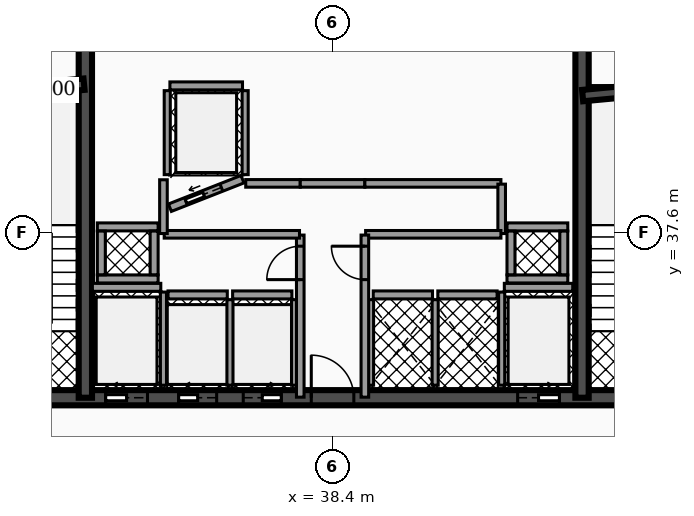
"""IFC4 building model, lengths in metres.
Left out: names, types, materials, properties, quantities, classifications, styles, units other than length and angle.
Written with IfcOpenShell. Run it as: python <this file> out.ifc"""

import sys

from ifc_helpers import new_model, si_unit, direction, frame, frame_2d, origin, place, context, subcontext, project, spatial, rectangle, extrude, element, fill, save


model = new_model("IFC4")
c1 = context("Model", 3, precision=1e-05, world=origin(), true_north=direction((0.0, 1.0)))
c2 = subcontext(c1, "Body", "Model", "MODEL_VIEW")
j1 = project(units=[si_unit("LENGTHUNIT", "METRE"), si_unit("PLANEANGLEUNIT", "RADIAN")], contexts=[c1])
p1 = place(None, origin())
s1 = spatial("IfcSite", under=j1, at=p1, CompositionType="ELEMENT")
p2 = place(p1, origin())
s2 = spatial("IfcBuilding", under=s1, at=p2, CompositionType="ELEMENT")
p3 = place(p2, frame((0.0, 0.0, 175.78)))
s3 = spatial("IfcBuildingStorey", under=s2, at=p3, CompositionType="ELEMENT", Elevation=175.78)
p4 = place(p3, frame((28.4, 33.25, 0.0), z_axis=(0.0, 0.0, 1.0), x_axis=(1.0, 0.0, 0.0)))
e1 = element("IfcWall", 1, at=p4, inside=s3, PredefinedType="SHEAR", context=c2, shape_type="SweptSolid", body=[
    extrude(rectangle(XDim=20.06, YDim=0.4, at=frame_2d((10.03, 0.0))), origin(), (0.0, 0.0, 1.0), 3.5),
])
p5 = place(p4, frame((4.03, 0.0, 0.0)))
e2 = element("IfcOpeningElement", 2, at=p5, cuts=e1, PredefinedType="OPENING", context=c2, shape_type="SweptSolid", body=[
    extrude(rectangle(XDim=1.1, YDim=2.15, at=frame_2d((0.55, 1.075))), frame((0.0, 0.21, 0.0), z_axis=(0.0, -1.0, 0.0), x_axis=(1.0, 0.0, 0.0)), (0.0, 0.0, 1.0), 0.42),
])
p6 = place(p4, frame((14.87, 0.0, 0.0)))
e3 = element("IfcOpeningElement", 3, at=p6, cuts=e1, PredefinedType="OPENING", context=c2, shape_type="SweptSolid", body=[
    extrude(rectangle(XDim=1.1, YDim=2.15, at=frame_2d((0.55, 1.075))), frame((0.0, 0.21, 0.0), z_axis=(0.0, -1.0, 0.0), x_axis=(1.0, 0.0, 0.0)), (0.0, 0.0, 1.0), 0.42),
])
p7 = place(p4, frame((5.95, 0.0, 0.0)))
e4 = element("IfcOpeningElement", 4, at=p7, cuts=e1, PredefinedType="OPENING", context=c2, shape_type="SweptSolid", body=[
    extrude(rectangle(XDim=1.0, YDim=2.1, at=frame_2d((0.5, 1.05))), frame((0.0, 0.21, 0.0), z_axis=(0.0, -1.0, 0.0), x_axis=(1.0, 0.0, 0.0)), (0.0, 0.0, 1.0), 0.42),
])
p8 = place(p4, frame((7.65, 0.0, 0.0)))
e5 = element("IfcOpeningElement", 5, at=p8, cuts=e1, PredefinedType="OPENING", context=c2, shape_type="SweptSolid", body=[
    extrude(rectangle(XDim=1.0, YDim=2.1, at=frame_2d((0.5, 1.05))), frame((0.0, 0.21, 0.0), z_axis=(0.0, -1.0, 0.0), x_axis=(1.0, 0.0, 0.0)), (0.0, 0.0, 1.0), 0.42),
])
p9 = place(p4, frame((1.31, 0.0, 0.0)))
e6 = element("IfcOpeningElement", 6, at=p9, cuts=e1, PredefinedType="OPENING", context=c2, shape_type="SweptSolid", body=[
    extrude(rectangle(XDim=1.1, YDim=2.2, at=frame_2d((0.55, 1.1))), frame((0.0, 0.21, 0.0), z_axis=(0.0, -1.0, 0.0), x_axis=(1.0, 0.0, 0.0)), (0.0, 0.0, 1.0), 0.42),
])
p10 = place(p4, frame((9.44, 0.0, 0.0)))
e7 = element("IfcOpeningElement", 7, at=p10, cuts=e1, PredefinedType="OPENING", context=c2, shape_type="SweptSolid", body=[
    extrude(rectangle(XDim=1.12, YDim=2.05, at=frame_2d((0.56, 1.025))), frame((0.0, 0.21, 0.0), z_axis=(0.0, -1.0, 0.0), x_axis=(1.0, 0.0, 0.0)), (0.0, 0.0, 1.0), 0.42),
])
p11 = place(p4, frame((17.65, 0.0, 0.0)))
e8 = element("IfcOpeningElement", 8, at=p11, cuts=e1, PredefinedType="OPENING", context=c2, shape_type="SweptSolid", body=[
    extrude(rectangle(XDim=1.1, YDim=2.2, at=frame_2d((0.55, 1.1))), frame((0.0, 0.21, 0.0), z_axis=(0.0, -1.0, 0.0), x_axis=(1.0, 0.0, 0.0)), (0.0, 0.0, 1.0), 0.42),
])
for number, where, z_axis, x_axis in (
    (9, (31.895, 33.25, 0.0), (0.0, 0.0, 1.0), (0.0, 1.0, 0.0)),
    (10, (44.965, 33.25, 0.0), (0.0, 0.0, 1.0), (0.0, 1.0, 0.0)),
):
    element("IfcWall", number, at=place(p3, frame(where, z_axis=z_axis, x_axis=x_axis)), inside=s3, PredefinedType="SHEAR", context=c2, shape_type="SweptSolid", body=[
        extrude(rectangle(XDim=10.2, YDim=0.35, at=frame_2d((5.1, 0.0))), origin(), (0.0, 0.0, 1.0), 3.5),
    ])
p12 = place(p3, frame((28.64, 41.2, 0.0), z_axis=(0.0, 0.0, 1.0), x_axis=(0.995687118776, 0.092774789157, 0.0)))
e11 = element("IfcWall", 11, at=p12, inside=s3, PredefinedType="SHEAR", context=c2, shape_type="SweptSolid", body=[
    extrude(rectangle(XDim=3.234, YDim=0.3, at=frame_2d((1.617, 0.0))), origin(), (0.0, 0.0, 1.0), 3.5),
])
p13 = place(p3, frame((44.98, 41.2, 0.0), z_axis=(0.0, 0.0, 1.0), x_axis=(0.995686468965, 0.09278176286, 0.0)))
e12 = element("IfcWall", 12, at=p13, inside=s3, PredefinedType="SHEAR", context=c2, shape_type="SweptSolid", body=[
    extrude(rectangle(XDim=3.234, YDim=0.3, at=frame_2d((1.617, 0.0))), origin(), (0.0, 0.0, 1.0), 3.5),
])
p14 = place(p3, frame((32.08, 36.155, 0.0), z_axis=(0.0, 0.0, 1.0), x_axis=(1.0, 0.0, 0.0)))
e13 = element("IfcWall", 13, at=p14, inside=s3, PredefinedType="SOLIDWALL", context=c2, shape_type="SweptSolid", body=[
    extrude(rectangle(XDim=1.8, YDim=0.21, at=frame_2d((0.9, 0.0))), origin(), (0.0, 0.0, 1.0), 2.472),
])
p15 = place(p3, frame((33.95, 33.58, 0.0), z_axis=(0.0, 0.0, 1.0), x_axis=(0.0, 1.0, 0.0)))
e14 = element("IfcWall", 14, at=p15, inside=s3, PredefinedType="SOLIDWALL", context=c2, shape_type="SweptSolid", body=[
    extrude(rectangle(XDim=2.45, YDim=0.16, at=frame_2d((1.225, 0.0))), origin(), (0.0, 0.0, 1.0), 2.472),
])
p16 = place(p3, frame((42.92, 36.155, 0.0), z_axis=(0.0, 0.0, 1.0), x_axis=(1.0, 0.0, 0.0)))
e15 = element("IfcWall", 15, at=p16, inside=s3, PredefinedType="SOLIDWALL", context=c2, shape_type="SweptSolid", body=[
    extrude(rectangle(XDim=1.8, YDim=0.21, at=frame_2d((0.9, 0.0))), origin(), (0.0, 0.0, 1.0), 2.472),
])
p17 = place(p3, frame((42.85, 33.58, 0.0), z_axis=(0.0, 0.0, 1.0), x_axis=(0.0, 1.0, 0.0)))
e16 = element("IfcWall", 16, at=p17, inside=s3, PredefinedType="SOLIDWALL", context=c2, shape_type="SweptSolid", body=[
    extrude(rectangle(XDim=2.45, YDim=0.16, at=frame_2d((1.225, 0.0))), origin(), (0.0, 0.0, 1.0), 2.472),
])
p18 = place(p3, frame((34.07, 35.955, 0.0), z_axis=(0.0, 0.0, 1.0), x_axis=(1.0, 0.0, 0.0)))
e17 = element("IfcWall", 17, at=p18, inside=s3, PredefinedType="SOLIDWALL", context=c2, shape_type="SweptSolid", body=[
    extrude(rectangle(XDim=1.56, YDim=0.21, at=frame_2d((0.78, 0.0))), origin(), (0.0, 0.0, 1.0), 2.472),
])
p19 = place(p3, frame((35.7, 33.58, 0.0), z_axis=(0.0, 0.0, 1.0), x_axis=(0.0, 1.0, 0.0)))
e18 = element("IfcWall", 18, at=p19, inside=s3, PredefinedType="SOLIDWALL", context=c2, shape_type="SweptSolid", body=[
    extrude(rectangle(XDim=2.25, YDim=0.16, at=frame_2d((1.125, 0.0))), origin(), (0.0, 0.0, 1.0), 2.472),
])
p20 = place(p3, frame((35.77, 35.955, 0.0), z_axis=(0.0, 0.0, 1.0), x_axis=(1.0, 0.0, 0.0)))
e19 = element("IfcWall", 19, at=p20, inside=s3, PredefinedType="SOLIDWALL", context=c2, shape_type="SweptSolid", body=[
    extrude(rectangle(XDim=1.56, YDim=0.21, at=frame_2d((0.78, 0.0))), origin(), (0.0, 0.0, 1.0), 2.472),
])
p21 = place(p3, frame((37.4, 33.58, 0.0), z_axis=(0.0, 0.0, 1.0), x_axis=(0.0, 1.0, 0.0)))
e20 = element("IfcWall", 20, at=p21, inside=s3, PredefinedType="SOLIDWALL", context=c2, shape_type="SweptSolid", body=[
    extrude(rectangle(XDim=2.25, YDim=0.16, at=frame_2d((1.125, 0.0))), origin(), (0.0, 0.0, 1.0), 2.472),
])
p22 = place(p3, frame((34.12, 38.25, 0.0), z_axis=(0.0, 0.0, 1.0), x_axis=(0.930804993012, 0.36551616241, 0.0)))
e21 = element("IfcWall", 21, at=p22, inside=s3, PredefinedType="SOLIDWALL", context=c2, shape_type="SweptSolid", body=[
    extrude(rectangle(XDim=2.052, YDim=0.21, at=frame_2d((1.026, 0.0))), origin(), (0.0, 0.0, 1.0), 2.472),
])
p23 = place(p22, frame((0.455, 0.0, 0.0)))
e22 = element("IfcOpeningElement", 22, at=p23, cuts=e21, PredefinedType="OPENING", context=c2, shape_type="SweptSolid", body=[
    extrude(rectangle(XDim=1.0, YDim=2.1, at=frame_2d((0.5, 1.05))), frame((0.0, 0.115, 0.0), z_axis=(0.0, -1.0, 0.0), x_axis=(1.0, 0.0, 0.0)), (0.0, 0.0, 1.0), 0.23),
])
p24 = place(p3, frame((34.12, 41.455, 0.0), z_axis=(0.0, 0.0, 1.0), x_axis=(1.0, 0.0, 0.0)))
e23 = element("IfcWall", 23, at=p24, inside=s3, PredefinedType="SOLIDWALL", context=c2, shape_type="SweptSolid", body=[
    extrude(rectangle(XDim=1.91, YDim=0.21, at=frame_2d((0.955, 0.0))), origin(), (0.0, 0.0, 1.0), 2.472),
])
for number, where, z_axis, x_axis in (
    (24, (34.05, 39.12, 0.0), (0.0, 0.0, 1.0), (0.0, 1.0, 0.0)),
    (25, (36.1, 39.12, 0.0), (0.0, 0.0, 1.0), (0.0, 1.0, 0.0)),
):
    element("IfcWall", number, at=place(p3, frame(where, z_axis=z_axis, x_axis=x_axis)), inside=s3, PredefinedType="SOLIDWALL", context=c2, shape_type="SweptSolid", body=[
        extrude(rectangle(XDim=2.21, YDim=0.16, at=frame_2d((1.105, 0.0))), origin(), (0.0, 0.0, 1.0), 2.472),
    ])
p25 = place(p3, frame((39.47, 35.955, 0.0), z_axis=(0.0, 0.0, 1.0), x_axis=(1.0, 0.0, 0.0)))
e26 = element("IfcWall", 26, at=p25, inside=s3, PredefinedType="SOLIDWALL", context=c2, shape_type="SweptSolid", body=[
    extrude(rectangle(XDim=1.56, YDim=0.21, at=frame_2d((0.78, 0.0))), origin(), (0.0, 0.0, 1.0), 2.472),
])
for number, where, z_axis, x_axis in (
    (27, (39.4, 33.58, 0.0), (0.0, 0.0, 1.0), (0.0, 1.0, 0.0)),
    (28, (41.1, 33.58, 0.0), (0.0, 0.0, 1.0), (0.0, 1.0, 0.0)),
):
    element("IfcWall", number, at=place(p3, frame(where, z_axis=z_axis, x_axis=x_axis)), inside=s3, PredefinedType="SOLIDWALL", context=c2, shape_type="SweptSolid", body=[
        extrude(rectangle(XDim=2.25, YDim=0.16, at=frame_2d((1.125, 0.0))), origin(), (0.0, 0.0, 1.0), 2.472),
    ])
p26 = place(p3, frame((41.17, 35.955, 0.0), z_axis=(0.0, 0.0, 1.0), x_axis=(1.0, 0.0, 0.0)))
e29 = element("IfcWall", 29, at=p26, inside=s3, PredefinedType="SOLIDWALL", context=c2, shape_type="SweptSolid", body=[
    extrude(rectangle(XDim=1.56, YDim=0.21, at=frame_2d((0.78, 0.0))), origin(), (0.0, 0.0, 1.0), 2.472),
])
for number, where, z_axis, x_axis in (
    (30, (32.21, 36.375, 0.0), (0.0, 0.0, 1.0), (1.0, 0.0, 0.0)),
    (31, (32.21, 37.745, 0.0), (0.0, 0.0, 1.0), (1.0, 0.0, 0.0)),
):
    element("IfcWall", number, at=place(p3, frame(where, z_axis=z_axis, x_axis=x_axis)), inside=s3, PredefinedType="SOLIDWALL", context=c2, shape_type="SweptSolid", body=[
        extrude(rectangle(XDim=1.6, YDim=0.21, at=frame_2d((0.8, 0.0))), origin(), (0.0, 0.0, 1.0), 3.5),
    ])
for number, where, z_axis, x_axis in (
    (32, (32.315, 36.485, 0.0), (0.0, 0.0, 1.0), (0.0, 1.0, 0.0)),
    (33, (33.705, 36.485, 0.0), (0.0, 0.0, 1.0), (0.0, 1.0, 0.0)),
):
    element("IfcWall", number, at=place(p3, frame(where, z_axis=z_axis, x_axis=x_axis)), inside=s3, PredefinedType="SOLIDWALL", context=c2, shape_type="SweptSolid", body=[
        extrude(rectangle(XDim=1.15, YDim=0.21, at=frame_2d((0.575, 0.0))), origin(), (0.0, 0.0, 1.0), 3.5),
    ])
for number, where, z_axis, x_axis in (
    (34, (42.99, 36.375, 0.0), (0.0, 0.0, 1.0), (1.0, 0.0, 0.0)),
    (35, (42.99, 37.745, 0.0), (0.0, 0.0, 1.0), (1.0, 0.0, 0.0)),
):
    element("IfcWall", number, at=place(p3, frame(where, z_axis=z_axis, x_axis=x_axis)), inside=s3, PredefinedType="SOLIDWALL", context=c2, shape_type="SweptSolid", body=[
        extrude(rectangle(XDim=1.6, YDim=0.21, at=frame_2d((0.8, 0.0))), origin(), (0.0, 0.0, 1.0), 3.5),
    ])
for number, where, z_axis, x_axis in (
    (36, (43.095, 36.485, 0.0), (0.0, 0.0, 1.0), (0.0, 1.0, 0.0)),
    (37, (44.485, 36.485, 0.0), (0.0, 0.0, 1.0), (0.0, 1.0, 0.0)),
):
    element("IfcWall", number, at=place(p3, frame(where, z_axis=z_axis, x_axis=x_axis)), inside=s3, PredefinedType="SOLIDWALL", context=c2, shape_type="SweptSolid", body=[
        extrude(rectangle(XDim=1.15, YDim=0.21, at=frame_2d((0.575, 0.0))), origin(), (0.0, 0.0, 1.0), 3.5),
    ])
p27 = place(p3, frame((37.55, 33.265, 0.0), z_axis=(0.0, 0.0, 1.0), x_axis=(0.0, 1.0, 0.0)))
e38 = element("IfcWall", 38, at=p27, inside=s3, PredefinedType="PARTITIONING", context=c2, shape_type="SweptSolid", body=[
    extrude(rectangle(XDim=4.265, YDim=0.2, at=frame_2d((2.133, 0.0))), origin(), (0.0, 0.0, 1.0), 2.457),
])
p28 = place(p27, frame((3.093, 0.0, 0.0)))
e39 = element("IfcOpeningElement", 39, at=p28, cuts=e38, PredefinedType="OPENING", context=c2, shape_type="SweptSolid", body=[
    extrude(rectangle(XDim=0.88, YDim=2.05, at=frame_2d((0.44, 1.025))), frame((0.0, 0.11, 0.0), z_axis=(0.0, -1.0, 0.0), x_axis=(1.0, 0.0, 0.0)), (0.0, 0.0, 1.0), 0.22),
])
p29 = place(p3, frame((33.97, 37.55, 0.0), z_axis=(0.0, 0.0, 1.0), x_axis=(1.0, 0.0, 0.0)))
e40 = element("IfcWall", 40, at=p29, inside=s3, PredefinedType="PARTITIONING", context=c2, shape_type="SweptSolid", body=[
    extrude(rectangle(XDim=3.56, YDim=0.2, at=frame_2d((1.78, 0.0))), origin(), (0.0, 0.0, 1.0), 2.457),
])
p30 = place(p3, frame((33.95, 37.57, 0.0), z_axis=(0.0, 0.0, 1.0), x_axis=(0.0, 1.0, 0.0)))
e41 = element("IfcWall", 41, at=p30, inside=s3, PredefinedType="PARTITIONING", context=c2, shape_type="SweptSolid", body=[
    extrude(rectangle(XDim=1.415, YDim=0.2, at=frame_2d((0.708, 0.0))), origin(), (0.0, 0.0, 1.0), 2.457),
])
p31 = place(p3, frame((36.115, 38.89, 0.0), z_axis=(0.0, 0.0, 1.0), x_axis=(1.0, 0.0, 0.0)))
e42 = element("IfcWall", 42, at=p31, inside=s3, PredefinedType="PARTITIONING", context=c2, shape_type="SweptSolid", body=[
    extrude(rectangle(XDim=1.435, YDim=0.2, at=frame_2d((0.718, 0.0))), origin(), (0.0, 0.0, 1.0), 2.457),
])
p32 = place(p3, frame((37.55, 38.89, 0.0), z_axis=(0.0, 0.0, 1.0), x_axis=(1.0, 0.0, 0.0)))
e43 = element("IfcWall", 43, at=p32, inside=s3, PredefinedType="PARTITIONING", context=c2, shape_type="SweptSolid", body=[
    extrude(rectangle(XDim=1.7, YDim=0.2, at=frame_2d((0.85, 0.0))), origin(), (0.0, 0.0, 1.0), 2.457),
])
p33 = place(p3, frame((39.25, 38.89, 0.0), z_axis=(0.0, 0.0, 1.0), x_axis=(1.0, 0.0, 0.0)))
e44 = element("IfcWall", 44, at=p33, inside=s3, PredefinedType="PARTITIONING", context=c2, shape_type="SweptSolid", body=[
    extrude(rectangle(XDim=3.58, YDim=0.2, at=frame_2d((1.79, 0.0))), origin(), (0.0, 0.0, 1.0), 2.457),
])
p34 = place(p3, frame((42.85, 37.57, 0.0), z_axis=(0.0, 0.0, 1.0), x_axis=(0.0, 1.0, 0.0)))
e45 = element("IfcWall", 45, at=p34, inside=s3, PredefinedType="PARTITIONING", context=c2, shape_type="SweptSolid", body=[
    extrude(rectangle(XDim=1.3, YDim=0.2, at=frame_2d((0.65, 0.0))), origin(), (0.0, 0.0, 1.0), 2.457),
])
p35 = place(p3, frame((39.27, 37.55, 0.0), z_axis=(0.0, 0.0, 1.0), x_axis=(1.0, 0.0, 0.0)))
e46 = element("IfcWall", 46, at=p35, inside=s3, PredefinedType="PARTITIONING", context=c2, shape_type="SweptSolid", body=[
    extrude(rectangle(XDim=3.56, YDim=0.2, at=frame_2d((1.78, 0.0))), origin(), (0.0, 0.0, 1.0), 2.457),
])
p36 = place(p3, frame((39.25, 33.265, 0.0), z_axis=(0.0, 0.0, 1.0), x_axis=(0.0, 1.0, 0.0)))
e47 = element("IfcWall", 47, at=p36, inside=s3, PredefinedType="PARTITIONING", context=c2, shape_type="SweptSolid", body=[
    extrude(rectangle(XDim=4.265, YDim=0.2, at=frame_2d((2.133, 0.0))), origin(), (0.0, 0.0, 1.0), 2.457),
])
p37 = place(p36, frame((3.093, 0.0, 0.0)))
e48 = element("IfcOpeningElement", 48, at=p37, cuts=e47, PredefinedType="OPENING", context=c2, shape_type="SweptSolid", body=[
    extrude(rectangle(XDim=0.88, YDim=2.05, at=frame_2d((0.44, 1.025))), frame((0.0, 0.11, 0.0), z_axis=(0.0, -1.0, 0.0), x_axis=(1.0, 0.0, 0.0)), (0.0, 0.0, 1.0), 0.22),
])
p38 = place(p5, origin())
e49 = element("IfcDoor", 49, at=p38, inside=s3, OperationType="SLIDING_TO_LEFT", PredefinedType="DOOR", context=c2, shape_type="SweptSolid", body=[
    extrude(rectangle(XDim=1.1, YDim=2.15, at=frame_2d((0.55, 1.075))), frame((0.0, 0.025, 0.0), z_axis=(0.0, -1.0, 0.0), x_axis=(1.0, 0.0, 0.0)), (0.0, 0.0, 1.0), 0.05),
])
fill(e2, e49)
p39 = place(p6, origin())
e50 = element("IfcDoor", 50, at=p39, inside=s3, OperationType="SLIDING_TO_RIGHT", PredefinedType="DOOR", context=c2, shape_type="SweptSolid", body=[
    extrude(rectangle(XDim=1.1, YDim=2.15, at=frame_2d((0.55, 1.075))), frame((0.0, 0.025, 0.0), z_axis=(0.0, -1.0, 0.0), x_axis=(1.0, 0.0, 0.0)), (0.0, 0.0, 1.0), 0.05),
])
fill(e3, e50)
p40 = place(p7, origin())
e51 = element("IfcDoor", 51, at=p40, inside=s3, OperationType="SLIDING_TO_LEFT", PredefinedType="DOOR", context=c2, shape_type="SweptSolid", body=[
    extrude(rectangle(XDim=1.0, YDim=2.1, at=frame_2d((0.5, 1.05))), frame((0.0, 0.025, 0.0), z_axis=(0.0, -1.0, 0.0), x_axis=(1.0, 0.0, 0.0)), (0.0, 0.0, 1.0), 0.05),
])
fill(e4, e51)
p41 = place(p8, origin())
e52 = element("IfcDoor", 52, at=p41, inside=s3, OperationType="SLIDING_TO_RIGHT", PredefinedType="DOOR", context=c2, shape_type="SweptSolid", body=[
    extrude(rectangle(XDim=1.0, YDim=2.1, at=frame_2d((0.5, 1.05))), frame((0.0, 0.025, 0.0), z_axis=(0.0, -1.0, 0.0), x_axis=(1.0, 0.0, 0.0)), (0.0, 0.0, 1.0), 0.05),
])
fill(e5, e52)
p42 = place(p23, origin())
e53 = element("IfcDoor", 53, at=p42, inside=s3, OperationType="SLIDING_TO_LEFT", PredefinedType="DOOR", context=c2, shape_type="SweptSolid", body=[
    extrude(rectangle(XDim=1.0, YDim=2.1, at=frame_2d((0.5, 1.05))), frame((0.0, 0.025, 0.0), z_axis=(0.0, -1.0, 0.0), x_axis=(1.0, 0.0, 0.0)), (0.0, 0.0, 1.0), 0.05),
])
fill(e22, e53)
p43 = place(p10, origin())
e54 = element("IfcDoor", 54, at=p43, inside=s3, OperationType="SINGLE_SWING_LEFT", PredefinedType="DOOR", context=c2, shape_type="SweptSolid", body=[
    extrude(rectangle(XDim=1.12, YDim=2.05, at=frame_2d((0.56, 1.025))), frame((0.0, 0.025, 0.0), z_axis=(0.0, -1.0, 0.0), x_axis=(1.0, 0.0, 0.0)), (0.0, 0.0, 1.0), 0.05),
])
fill(e7, e54)
p44 = place(p28, origin())
e55 = element("IfcDoor", 55, at=p44, inside=s3, OperationType="SINGLE_SWING_LEFT", PredefinedType="DOOR", context=c2, shape_type="SweptSolid", body=[
    extrude(rectangle(XDim=0.88, YDim=2.05, at=frame_2d((0.44, 1.025))), frame((0.0, 0.025, 0.0), z_axis=(0.0, -1.0, 0.0), x_axis=(1.0, 0.0, 0.0)), (0.0, 0.0, 1.0), 0.05),
])
fill(e39, e55)
p45 = place(p37, origin())
e56 = element("IfcDoor", 56, at=p45, inside=s3, OperationType="SINGLE_SWING_RIGHT", PredefinedType="DOOR", context=c2, shape_type="SweptSolid", body=[
    extrude(rectangle(XDim=0.88, YDim=2.05, at=frame_2d((0.44, 1.025))), frame((0.0, 0.025, 0.0), z_axis=(0.0, -1.0, 0.0), x_axis=(1.0, 0.0, 0.0)), (0.0, 0.0, 1.0), 0.05),
])
fill(e48, e56)
save(model, sys.argv[1])
